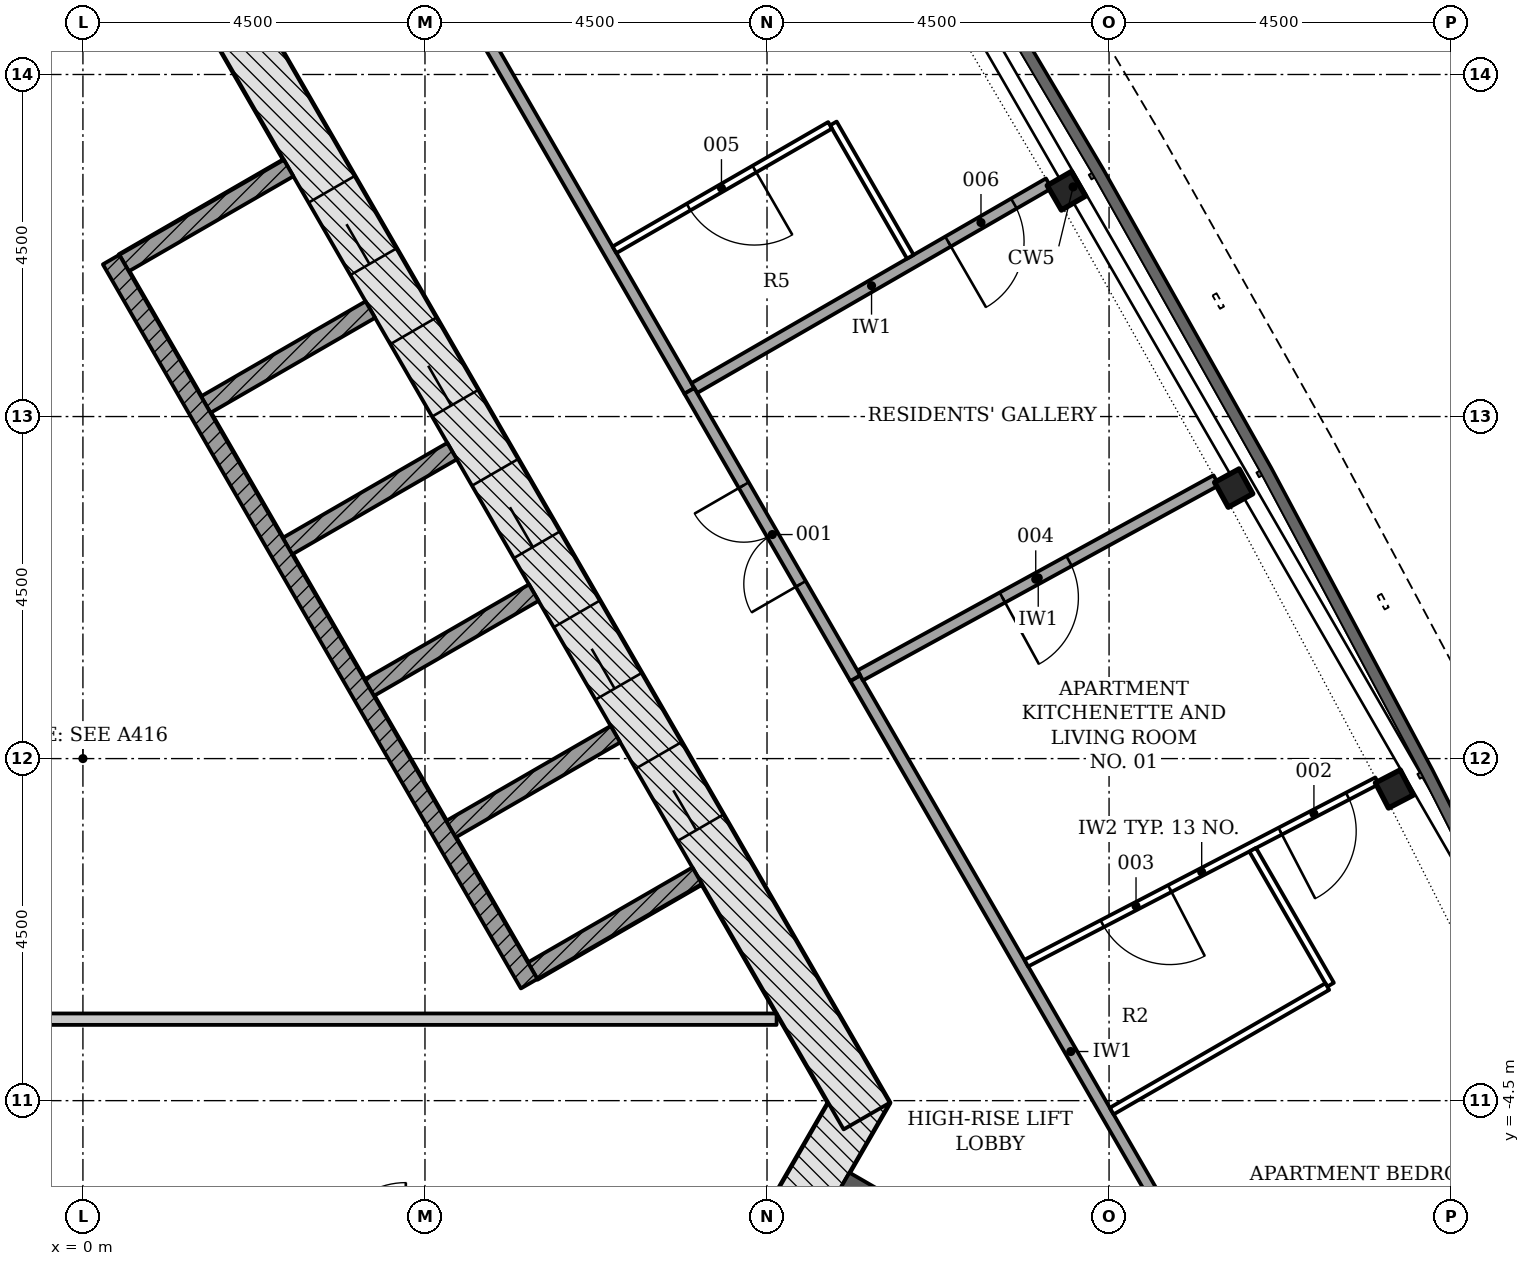
"""IFC4 building model, lengths in metres.
Left out: names, types, materials, properties, quantities, classifications, styles, units other than length and angle.
Written with IfcOpenShell. Run it as: python <this file> out.ifc"""

import sys

from ifc_helpers import new_model, si_unit, direction, frame, frame_2d, origin, origin_2d, place, context, subcontext, project, spatial, polyline, rectangle, i_section, outline, extrude, element, fill, save


model = new_model("IFC4")
c1 = context("Model", 3, precision=1e-05, world=origin(), true_north=direction((0.0, 1.0)))
c2 = subcontext(c1, "Body", "Model", "MODEL_VIEW")
j1 = project(units=[si_unit("LENGTHUNIT", "METRE"), si_unit("PLANEANGLEUNIT", "RADIAN")], contexts=[c1])
p1 = place(None, origin())
s1 = spatial("IfcSite", under=j1, at=p1, CompositionType="ELEMENT")
p2 = place(p1, origin())
s2 = spatial("IfcBuilding", under=s1, at=p2, CompositionType="ELEMENT")
p3 = place(p2, frame((0.0, 0.0, 214.8)))
s3 = spatial("IfcBuildingStorey", under=s2, at=p3, CompositionType="ELEMENT", Elevation=214.8)
p4 = place(p3, frame((8.926, -6.753, -0.2), z_axis=(0.0, 0.0, 1.0), x_axis=(0.500042739161, 0.866000726912, 0.0)))
e1 = element("IfcWall", 1, at=p4, inside=s3, PredefinedType="SHEAR", context=c2, shape_type="SweptSolid", body=[
    extrude(rectangle(XDim=2.771, YDim=0.7, at=frame_2d((1.386, 0.0))), origin(), (0.0, 0.0, 1.0), 3.6),
])
p5 = place(p3, frame((10.311, -4.703, -0.2), z_axis=(0.0, 0.0, 1.0), x_axis=(-0.500001446645, 0.866024568562, 0.0)))
e2 = element("IfcWall", 2, at=p5, inside=s3, PredefinedType="SHEAR", context=c2, shape_type="SweptSolid", body=[
    extrude(rectangle(XDim=18.458, YDim=0.7, at=frame_2d((9.229, 0.0))), origin(), (0.0, 0.0, 1.0), 3.6),
])
p6 = place(p5, frame((4.379, 0.0, 0.2)))
e3 = element("IfcOpeningElement", 3, at=p6, cuts=e2, PredefinedType="OPENING", context=c2, shape_type="SweptSolid", body=[
    extrude(rectangle(XDim=1.1, YDim=2.1, at=frame_2d((0.55, 1.05))), frame((0.0, 0.36, 0.0), z_axis=(0.0, -1.0, 0.0), x_axis=(1.0, 0.0, 0.0)), (0.0, 0.0, 1.0), 0.72),
])
p7 = place(p5, frame((6.529, 0.0, 0.2)))
e4 = element("IfcOpeningElement", 4, at=p7, cuts=e2, PredefinedType="OPENING", context=c2, shape_type="SweptSolid", body=[
    extrude(rectangle(XDim=1.1, YDim=2.1, at=frame_2d((0.55, 1.05))), frame((0.0, 0.36, 0.0), z_axis=(0.0, -1.0, 0.0), x_axis=(1.0, 0.0, 0.0)), (0.0, 0.0, 1.0), 0.72),
])
p8 = place(p5, frame((8.679, 0.0, 0.2)))
e5 = element("IfcOpeningElement", 5, at=p8, cuts=e2, PredefinedType="OPENING", context=c2, shape_type="SweptSolid", body=[
    extrude(rectangle(XDim=1.1, YDim=2.1, at=frame_2d((0.55, 1.05))), frame((0.0, 0.36, 0.0), z_axis=(0.0, -1.0, 0.0), x_axis=(1.0, 0.0, 0.0)), (0.0, 0.0, 1.0), 0.72),
])
p9 = place(p5, frame((10.829, 0.0, 0.2)))
e6 = element("IfcOpeningElement", 6, at=p9, cuts=e2, PredefinedType="OPENING", context=c2, shape_type="SweptSolid", body=[
    extrude(rectangle(XDim=1.1, YDim=2.1, at=frame_2d((0.55, 1.05))), frame((0.0, 0.36, 0.0), z_axis=(0.0, -1.0, 0.0), x_axis=(1.0, 0.0, 0.0)), (0.0, 0.0, 1.0), 0.72),
])
p10 = place(p5, frame((12.979, 0.0, 0.2)))
e7 = element("IfcOpeningElement", 7, at=p10, cuts=e2, PredefinedType="OPENING", context=c2, shape_type="SweptSolid", body=[
    extrude(rectangle(XDim=1.1, YDim=2.1, at=frame_2d((0.55, 1.05))), frame((0.0, 0.36, 0.0), z_axis=(0.0, -1.0, 0.0), x_axis=(1.0, 0.0, 0.0)), (0.0, 0.0, 1.0), 0.72),
])
p11 = place(p3, frame((9.922, -5.728, -0.2), z_axis=(0.0, 0.0, 1.0), x_axis=(0.866030911543, -0.499990460161, 0.0)))
e8 = element("IfcWall", 8, at=p11, inside=s3, PredefinedType="SHEAR", context=c2, shape_type="SweptSolid", body=[
    extrude(rectangle(XDim=8.359, YDim=0.65, at=frame_2d((4.179, 0.0))), origin(), (0.0, 0.0, 1.0), 3.6),
])
for number, where, z_axis, x_axis in (
    (9, (17.253, -0.4, -0.2), (0.0, 0.0, 1.0), (-0.461, 0.887, 0.0)),
    (10, (15.14, 3.559, -0.2), (0.0, 0.0, 1.0), (-0.481, 0.877, 0.0)),
    (11, (12.939, 7.47, -0.2), (0.0, 0.0, 1.0), (-0.5, 0.866, 0.0)),
):
    element("IfcColumn", number, at=place(p3, frame(where, z_axis=z_axis, x_axis=x_axis)), inside=s3, PredefinedType="COLUMN", context=c2, shape_type="SweptSolid", body=[
        extrude(i_section(OverallWidth=0.373, OverallDepth=0.368, WebThickness=0.015, FlangeThickness=0.024, FilletRadius=0.015, at=origin_2d()), origin(), (0.0, 0.0, 1.0), 3.6),
    ])
p12 = place(p3, origin())
e12 = element("IfcWall", 12, at=p12, inside=s3, PredefinedType="NOTDEFINED", context=c2, shape_type="SweptSolid", body=[
    extrude(outline(polyline([(13.49, -15.042), (15.507, -14.898), (16.988, -14.602), (18.354, -13.958), (19.526, -13.004), (20.434, -11.797), (21.025, -10.408), (21.265, -8.917), (21.139, -7.411), (20.656, -5.98), (19.772, -4.162), (19.502, -4.293), (20.378, -6.094), (20.844, -7.473), (20.963, -8.905), (20.735, -10.324), (20.172, -11.646), (19.308, -12.795), (18.193, -13.702), (16.893, -14.315), (15.467, -14.6), (13.469, -14.743), (13.49, -15.042)])), origin(), (0.0, 0.0, 1.0), 3.3),
])
for number, where, z_axis, x_axis in (
    (13, (8.081, -1.541, -0.2), (0.0, 0.0, 1.0), (-0.866, -0.5, 0.0)),
    (14, (7.006, 0.321, -0.2), (0.0, 0.0, 1.0), (-0.866, -0.5, 0.0)),
):
    element("IfcWall", number, at=place(p3, frame(where, z_axis=z_axis, x_axis=x_axis)), inside=s3, PredefinedType="PARTITIONING", context=c2, shape_type="SweptSolid", body=[
        extrude(rectangle(XDim=2.5, YDim=0.25, at=frame_2d((1.25, 0.0))), origin(), (0.0, 0.0, 1.0), 3.6),
    ])
p13 = place(p3, frame((5.931, 2.183, -0.2), z_axis=(0.0, 0.0, 1.0), x_axis=(-0.866047370643, -0.499961950354, 0.0)))
e15 = element("IfcWall", 15, at=p13, inside=s3, PredefinedType="PARTITIONING", context=c2, shape_type="SweptSolid", body=[
    extrude(rectangle(XDim=2.5, YDim=0.25, at=frame_2d((1.25, 0.0))), origin(), (0.0, 0.0, 1.0), 3.6),
])
for number, where, z_axis, x_axis in (
    (16, (4.856, 4.045, -0.2), (0.0, 0.0, 1.0), (-0.866, -0.5, 0.0)),
    (17, (3.781, 5.907, -0.2), (0.0, 0.0, 1.0), (-0.866, -0.5, 0.0)),
    (18, (2.706, 7.769, -0.2), (0.0, 0.0, 1.0), (-0.866, -0.5, 0.0)),
):
    element("IfcWall", number, at=place(p3, frame(where, z_axis=z_axis, x_axis=x_axis)), inside=s3, PredefinedType="PARTITIONING", context=c2, shape_type="SweptSolid", body=[
        extrude(rectangle(XDim=2.5, YDim=0.25, at=frame_2d((1.25, 0.0))), origin(), (0.0, 0.0, 1.0), 3.6),
    ])
p14 = place(p3, frame((5.87, -2.961, 0.0), z_axis=(0.0, 0.0, 1.0), x_axis=(-0.50000615651, 0.866021849293, 0.0)))
e19 = element("IfcWall", 19, at=p14, inside=s3, PredefinedType="PARTITIONING", context=c2, shape_type="SweptSolid", body=[
    extrude(rectangle(XDim=11.0, YDim=0.25, at=frame_2d((5.5, 0.0))), origin(), (0.0, 0.0, 1.0), 3.4),
])
p15 = place(p3, frame((-0.954, -3.428, 0.0), z_axis=(0.0, 0.0, 1.0), x_axis=(1.0, 0.0, 0.0)))
e20 = element("IfcWall", 20, at=p15, inside=s3, PredefinedType="PARTITIONING", context=c2, shape_type="SweptSolid", body=[
    extrude(rectangle(XDim=10.08, YDim=0.15, at=frame_2d((5.04, 0.0))), origin(), (0.0, 0.0, 1.0), 3.4),
])
p16 = place(p3, frame((15.832, -8.765, 0.0), z_axis=(0.0, 0.0, 1.0), x_axis=(-0.500005035328, 0.866022496617, 0.0)))
e21 = element("IfcWall", 21, at=p16, inside=s3, PredefinedType="PARTITIONING", context=c2, shape_type="SweptSolid", body=[
    extrude(rectangle(XDim=11.343, YDim=0.15, at=frame_2d((5.671, 0.0))), origin(), (0.0, 0.0, 1.0), 2.852),
])
p17 = place(p3, frame((7.979, 4.837, 0.0), z_axis=(0.0, 0.0, 1.0), x_axis=(-0.500014427086, 0.866017074142, 0.0)))
e22 = element("IfcWall", 22, at=p17, inside=s3, PredefinedType="PARTITIONING", context=c2, shape_type="SweptSolid", body=[
    extrude(rectangle(XDim=7.528, YDim=0.15, at=frame_2d((3.764, 0.0))), origin(), (0.0, 0.0, 1.0), 2.852),
])
p18 = place(p3, frame((14.91, 3.661, 0.0), z_axis=(0.0, 0.0, 1.0), x_axis=(-0.87687518663, -0.480718116023, 0.0)))
e23 = element("IfcWall", 23, at=p18, inside=s3, PredefinedType="PARTITIONING", context=c2, shape_type="SweptSolid", body=[
    extrude(rectangle(XDim=5.341, YDim=0.15, at=frame_2d((2.671, 0.0))), origin(), (0.0, 0.0, 1.0), 3.4),
])
p19 = place(p18, frame((2.208, 0.0, 0.0)))
e24 = element("IfcOpeningElement", 24, at=p19, cuts=e23, PredefinedType="OPENING", context=c2, shape_type="SweptSolid", body=[
    extrude(rectangle(XDim=1.0, YDim=2.1, at=frame_2d((0.5, 1.05))), frame((0.0, 0.085, 0.0), z_axis=(0.0, -1.0, 0.0), x_axis=(1.0, 0.0, 0.0)), (0.0, 0.0, 1.0), 0.17),
])
p20 = place(p3, frame((12.707, 7.567, 0.0), z_axis=(0.0, 0.0, 1.0), x_axis=(-0.866016468327, -0.500015476347, 0.0)))
e25 = element("IfcWall", 25, at=p20, inside=s3, PredefinedType="PARTITIONING", context=c2, shape_type="SweptSolid", body=[
    extrude(rectangle(XDim=5.385, YDim=0.15, at=frame_2d((2.692, 0.0))), origin(), (0.0, 0.0, 1.0), 3.4),
])
p21 = place(p20, frame((0.53, 0.0, 0.0)))
e26 = element("IfcOpeningElement", 26, at=p21, cuts=e25, PredefinedType="OPENING", context=c2, shape_type="SweptSolid", body=[
    extrude(rectangle(XDim=1.0, YDim=2.1, at=frame_2d((0.5, 1.05))), frame((0.0, 0.085, 0.0), z_axis=(0.0, -1.0, 0.0), x_axis=(1.0, 0.0, 0.0)), (0.0, 0.0, 1.0), 0.17),
])
p22 = place(p3, frame((10.161, 1.058, 0.0), z_axis=(0.0, 0.0, 1.0), x_axis=(-0.499977476193, 0.86603840752, 0.0)))
e27 = element("IfcWall", 27, at=p22, inside=s3, PredefinedType="PARTITIONING", context=c2, shape_type="SweptSolid", body=[
    extrude(rectangle(XDim=4.365, YDim=0.15, at=frame_2d((2.182, 0.0))), origin(), (0.0, 0.0, 1.0), 2.852),
])
p23 = place(p22, frame((1.432, 0.0, 0.0)))
e28 = element("IfcOpeningElement", 28, at=p23, cuts=e27, PredefinedType="OPENING", context=c2, shape_type="SweptSolid", body=[
    extrude(rectangle(XDim=1.5, YDim=2.1, at=frame_2d((0.75, 1.05))), frame((0.0, 0.085, 0.0), z_axis=(0.0, -1.0, 0.0), x_axis=(1.0, 0.0, 0.0)), (0.0, 0.0, 1.0), 0.17),
])
p24 = place(p3, frame((17.026, -0.292, 0.0), z_axis=(0.0, 0.0, 1.0), x_axis=(-0.887303639302, -0.461185701947, 0.0)))
e29 = element("IfcWall", 29, at=p24, inside=s3, PredefinedType="PARTITIONING", context=c2, shape_type="SweptSolid", body=[
    extrude(rectangle(XDim=5.201, YDim=0.1, at=frame_2d((2.6, 0.0))), origin(), (0.0, 0.0, 1.0), 3.4),
])
p25 = place(p24, frame((0.436, 0.0, 0.0)))
e30 = element("IfcOpeningElement", 30, at=p25, cuts=e29, PredefinedType="OPENING", context=c2, shape_type="SweptSolid", body=[
    extrude(rectangle(XDim=1.0, YDim=2.1, at=frame_2d((0.5, 1.05))), frame((0.0, 0.06, 0.0), z_axis=(0.0, -1.0, 0.0), x_axis=(1.0, 0.0, 0.0)), (0.0, 0.0, 1.0), 0.12),
])
p26 = place(p24, frame((3.074, 0.0, 0.0)))
e31 = element("IfcOpeningElement", 31, at=p26, cuts=e29, PredefinedType="OPENING", context=c2, shape_type="SweptSolid", body=[
    extrude(rectangle(XDim=1.0, YDim=2.1, at=frame_2d((0.5, 1.05))), frame((0.0, 0.06, 0.0), z_axis=(0.0, -1.0, 0.0), x_axis=(1.0, 0.0, 0.0)), (0.0, 0.0, 1.0), 0.12),
])
p27 = place(p3, frame((15.39, -1.199, 0.0), z_axis=(0.0, 0.0, 1.0), x_axis=(0.499956128963, -0.866050731258, 0.0)))
e32 = element("IfcWall", 32, at=p27, inside=s3, PredefinedType="PARTITIONING", context=c2, shape_type="SweptSolid", body=[
    extrude(rectangle(XDim=2.05, YDim=0.1, at=frame_2d((1.025, 0.0))), origin(), (0.0, 0.0, 1.0), 2.852),
])
p28 = place(p3, frame((16.371, -3.0, 0.0), z_axis=(0.0, 0.0, 1.0), x_axis=(-0.866027924134, -0.499995634601, 0.0)))
e33 = element("IfcWall", 33, at=p28, inside=s3, PredefinedType="PARTITIONING", context=c2, shape_type="SweptSolid", body=[
    extrude(rectangle(XDim=3.275, YDim=0.1, at=frame_2d((1.637, 0.0))), origin(), (0.0, 0.0, 1.0), 3.4),
])
p29 = place(p3, frame((10.885, 6.602, 0.0), z_axis=(0.0, 0.0, 1.0), x_axis=(-0.499990325971, 0.866030989016, 0.0)))
e34 = element("IfcWall", 34, at=p29, inside=s3, PredefinedType="PARTITIONING", context=c2, shape_type="SweptSolid", body=[
    extrude(rectangle(XDim=2.025, YDim=0.1, at=frame_2d((1.012, 0.0))), origin(), (0.0, 0.0, 1.0), 3.4),
])
p30 = place(p3, frame((9.83, 8.331, 0.0), z_axis=(0.0, 0.0, 1.0), x_axis=(-0.865995643347, -0.500051543047, 0.0)))
e35 = element("IfcWall", 35, at=p30, inside=s3, PredefinedType="PARTITIONING", context=c2, shape_type="SweptSolid", body=[
    extrude(rectangle(XDim=3.275, YDim=0.1, at=frame_2d((1.638, 0.0))), origin(), (0.0, 0.0, 1.0), 3.4),
])
p31 = place(p30, frame((1.15, 0.0, 0.0)))
e36 = element("IfcOpeningElement", 36, at=p31, cuts=e35, PredefinedType="OPENING", context=c2, shape_type="SweptSolid", body=[
    extrude(rectangle(XDim=1.0, YDim=2.1, at=frame_2d((0.5, 1.05))), frame((0.0, 0.06, 0.0), z_axis=(0.0, -1.0, 0.0), x_axis=(1.0, 0.0, 0.0)), (0.0, 0.0, 1.0), 0.12),
])
p32 = place(p3, frame((-0.325, 18.894, 0.0), z_axis=(0.0, 0.0, 1.0), x_axis=(-0.50000126085, -0.866024675831, 0.0)))
e37 = element("IfcWall", 37, at=p32, inside=s3, PredefinedType="PARTITIONING", context=c2, shape_type="SweptSolid", body=[
    extrude(rectangle(XDim=12.027, YDim=0.15, at=frame_2d((6.013, 0.0))), origin(), (0.0, 0.0, 1.0), 2.852),
])
p33 = place(p6, origin())
e38 = element("IfcDoor", 38, at=p33, inside=s3, OperationType="DOUBLE_DOOR_SLIDING", PredefinedType="DOOR", context=c2, shape_type="SweptSolid", body=[
    extrude(rectangle(XDim=1.1, YDim=2.1, at=frame_2d((0.55, 1.05))), frame((0.0, 0.025, 0.0), z_axis=(0.0, -1.0, 0.0), x_axis=(1.0, 0.0, 0.0)), (0.0, 0.0, 1.0), 0.05),
])
fill(e3, e38)
p34 = place(p7, origin())
e39 = element("IfcDoor", 39, at=p34, inside=s3, OperationType="DOUBLE_DOOR_SLIDING", PredefinedType="DOOR", context=c2, shape_type="SweptSolid", body=[
    extrude(rectangle(XDim=1.1, YDim=2.1, at=frame_2d((0.55, 1.05))), frame((0.0, 0.025, 0.0), z_axis=(0.0, -1.0, 0.0), x_axis=(1.0, 0.0, 0.0)), (0.0, 0.0, 1.0), 0.05),
])
fill(e4, e39)
p35 = place(p8, origin())
e40 = element("IfcDoor", 40, at=p35, inside=s3, OperationType="DOUBLE_DOOR_SLIDING", PredefinedType="DOOR", context=c2, shape_type="SweptSolid", body=[
    extrude(rectangle(XDim=1.1, YDim=2.1, at=frame_2d((0.55, 1.05))), frame((0.0, 0.025, 0.0), z_axis=(0.0, -1.0, 0.0), x_axis=(1.0, 0.0, 0.0)), (0.0, 0.0, 1.0), 0.05),
])
fill(e5, e40)
p36 = place(p9, origin())
e41 = element("IfcDoor", 41, at=p36, inside=s3, OperationType="DOUBLE_DOOR_SLIDING", PredefinedType="DOOR", context=c2, shape_type="SweptSolid", body=[
    extrude(rectangle(XDim=1.1, YDim=2.1, at=frame_2d((0.55, 1.05))), frame((0.0, 0.025, 0.0), z_axis=(0.0, -1.0, 0.0), x_axis=(1.0, 0.0, 0.0)), (0.0, 0.0, 1.0), 0.05),
])
fill(e6, e41)
p37 = place(p10, origin())
e42 = element("IfcDoor", 42, at=p37, inside=s3, OperationType="DOUBLE_DOOR_SLIDING", PredefinedType="DOOR", context=c2, shape_type="SweptSolid", body=[
    extrude(rectangle(XDim=1.1, YDim=2.1, at=frame_2d((0.55, 1.05))), frame((0.0, 0.025, 0.0), z_axis=(0.0, -1.0, 0.0), x_axis=(1.0, 0.0, 0.0)), (0.0, 0.0, 1.0), 0.05),
])
fill(e7, e42)
p38 = place(p23, origin())
e43 = element("IfcDoor", 43, at=p38, inside=s3, OperationType="DOUBLE_DOOR_SINGLE_SWING", PredefinedType="DOOR", context=c2, shape_type="SweptSolid", body=[
    extrude(rectangle(XDim=1.5, YDim=2.1, at=frame_2d((0.75, 1.05))), frame((0.0, 0.025, 0.0), z_axis=(0.0, -1.0, 0.0), x_axis=(1.0, 0.0, 0.0)), (0.0, 0.0, 1.0), 0.05),
])
fill(e28, e43)
p39 = place(p25, origin())
e44 = element("IfcDoor", 44, at=p39, inside=s3, OperationType="SINGLE_SWING_RIGHT", PredefinedType="DOOR", context=c2, shape_type="SweptSolid", body=[
    extrude(rectangle(XDim=1.0, YDim=2.1, at=frame_2d((0.5, 1.05))), frame((0.0, 0.025, 0.0), z_axis=(0.0, -1.0, 0.0), x_axis=(1.0, 0.0, 0.0)), (0.0, 0.0, 1.0), 0.05),
])
fill(e30, e44)
p40 = place(p26, origin())
e45 = element("IfcDoor", 45, at=p40, inside=s3, OperationType="SINGLE_SWING_LEFT", PredefinedType="DOOR", context=c2, shape_type="SweptSolid", body=[
    extrude(rectangle(XDim=1.0, YDim=2.1, at=frame_2d((0.5, 1.05))), frame((0.0, 0.025, 0.0), z_axis=(0.0, -1.0, 0.0), x_axis=(1.0, 0.0, 0.0)), (0.0, 0.0, 1.0), 0.05),
])
fill(e31, e45)
p41 = place(p19, origin())
e46 = element("IfcDoor", 46, at=p41, inside=s3, OperationType="SINGLE_SWING_RIGHT", PredefinedType="DOOR", context=c2, shape_type="SweptSolid", body=[
    extrude(rectangle(XDim=1.0, YDim=2.1, at=frame_2d((0.5, 1.05))), frame((0.0, 0.025, 0.0), z_axis=(0.0, -1.0, 0.0), x_axis=(1.0, 0.0, 0.0)), (0.0, 0.0, 1.0), 0.05),
])
fill(e24, e46)
p42 = place(p31, origin())
e47 = element("IfcDoor", 47, at=p42, inside=s3, OperationType="SINGLE_SWING_LEFT", PredefinedType="DOOR", context=c2, shape_type="SweptSolid", body=[
    extrude(rectangle(XDim=1.0, YDim=2.1, at=frame_2d((0.5, 1.05))), frame((0.0, 0.025, 0.0), z_axis=(0.0, -1.0, 0.0), x_axis=(1.0, 0.0, 0.0)), (0.0, 0.0, 1.0), 0.05),
])
fill(e36, e47)
p43 = place(p21, origin())
e48 = element("IfcDoor", 48, at=p43, inside=s3, OperationType="SINGLE_SWING_RIGHT", PredefinedType="DOOR", context=c2, shape_type="SweptSolid", body=[
    extrude(rectangle(XDim=1.0, YDim=2.1, at=frame_2d((0.5, 1.05))), frame((0.0, 0.025, 0.0), z_axis=(0.0, -1.0, 0.0), x_axis=(1.0, 0.0, 0.0)), (0.0, 0.0, 1.0), 0.05),
])
fill(e26, e48)
save(model, sys.argv[1])
